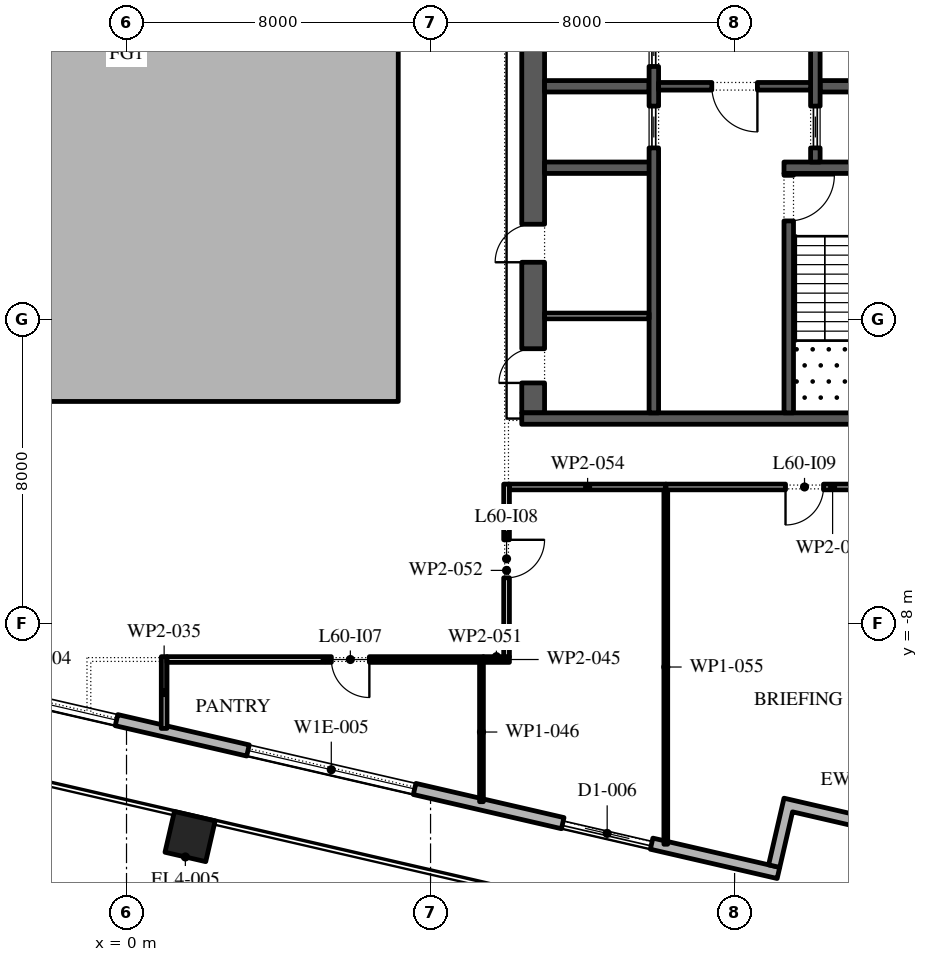
"""IFC4 building model, lengths in metres.
Left out: names, types, materials, properties, quantities, classifications, styles, units other than length and angle.
Written with IfcOpenShell. Run it as: python <this file> out.ifc"""

import sys

from ifc_helpers import new_model, si_unit, direction, frame, frame_2d, origin, origin_2d, place, context, subcontext, project, spatial, polyline, rectangle, outline, extrude, element, fill, save


model = new_model("IFC4")
c1 = context("Model", 3, precision=1e-05, world=origin(), true_north=direction((0.0, 1.0)))
c2 = subcontext(c1, "Body", "Model", "MODEL_VIEW")
j1 = project(units=[si_unit("LENGTHUNIT", "METRE"), si_unit("PLANEANGLEUNIT", "RADIAN")], contexts=[c1])
p1 = place(None, origin())
s1 = spatial("IfcSite", under=j1, at=p1, CompositionType="ELEMENT")
p2 = place(p1, origin())
s2 = spatial("IfcBuilding", under=s1, at=p2, CompositionType="ELEMENT")
p3 = place(p2, frame((0.0, 0.0, 276.6)))
s3 = spatial("IfcBuildingStorey", under=s2, at=p3, CompositionType="ELEMENT", Elevation=276.6)
p4 = place(p3, frame((1.672, -13.599, 0.0), z_axis=(0.0, 0.0, 1.0), x_axis=(0.974370064785, -0.224951054344, 0.0)))
e1 = element("IfcColumn", 1, at=p4, inside=s3, PredefinedType="COLUMN", context=c2, shape_type="SweptSolid", body=[
    extrude(rectangle(XDim=1.1, YDim=1.1, at=origin_2d()), origin(), (0.0, 0.0, 1.0), 4.2),
])
p5 = place(p3, origin())
e2 = element("IfcWall", 2, at=p5, inside=s3, PredefinedType="STANDARD", context=c2, shape_type="SweptSolid", body=[
    extrude(outline(polyline([(-7.15, -2.15), (7.15, -2.15), (7.15, 16.15), (-7.15, 16.15), (-7.15, -2.15)]), holes=[polyline([(-7.0, -2.0), (-7.0, 16.0), (7.0, 16.0), (7.0, -2.0), (-7.0, -2.0)])]), origin(), (0.0, 0.0, 1.0), 4.0),
])
p6 = place(p3, frame((-29.616, -3.758, 0.0), z_axis=(0.0, 0.0, 1.0), x_axis=(0.974370532314, -0.224949029246, 0.0)))
e3 = element("IfcWall", 3, at=p6, inside=s3, PredefinedType="STANDARD", context=c2, shape_type="SweptSolid", body=[
    extrude(rectangle(XDim=48.0, YDim=0.3, at=frame_2d((24.0, 0.0))), origin(), (0.0, 0.0, 1.0), 4.0),
])
p7 = place(p6, frame((1.625, 0.0, 0.45)))
e4 = element("IfcOpeningElement", 4, at=p7, cuts=e3, PredefinedType="OPENING", context=c2, shape_type="SweptSolid", body=[
    extrude(rectangle(XDim=4.5, YDim=3.05, at=frame_2d((2.25, 1.525))), frame((0.0, 0.16, 0.0), z_axis=(0.0, -1.0, 0.0), x_axis=(1.0, 0.0, 0.0)), (0.0, 0.0, 1.0), 0.32),
])
p8 = place(p6, frame((10.575, 0.0, 0.0)))
e5 = element("IfcOpeningElement", 5, at=p8, cuts=e3, PredefinedType="OPENING", context=c2, shape_type="SweptSolid", body=[
    extrude(rectangle(XDim=2.4, YDim=3.5, at=frame_2d((1.2, 1.75))), frame((0.0, 0.16, 0.0), z_axis=(0.0, -1.0, 0.0), x_axis=(1.0, 0.0, 0.0)), (0.0, 0.0, 1.0), 0.32),
])
p9 = place(p6, frame((17.575, 0.0, 0.45)))
e6 = element("IfcOpeningElement", 6, at=p9, cuts=e3, PredefinedType="OPENING", context=c2, shape_type="SweptSolid", body=[
    extrude(rectangle(XDim=4.5, YDim=3.0, at=frame_2d((2.25, 1.5))), frame((0.0, 0.16, 0.0), z_axis=(0.0, -1.0, 0.0), x_axis=(1.0, 0.0, 0.0)), (0.0, 0.0, 1.0), 0.32),
])
p10 = place(p6, frame((25.625, 0.0, 0.45)))
e7 = element("IfcOpeningElement", 7, at=p10, cuts=e3, PredefinedType="OPENING", context=c2, shape_type="SweptSolid", body=[
    extrude(rectangle(XDim=4.5, YDim=2.95, at=frame_2d((2.25, 1.475))), frame((0.0, 0.16, 0.0), z_axis=(0.0, -1.0, 0.0), x_axis=(1.0, 0.0, 0.0)), (0.0, 0.0, 1.0), 0.32),
])
p11 = place(p6, frame((33.675, 0.0, 0.45)))
e8 = element("IfcOpeningElement", 8, at=p11, cuts=e3, PredefinedType="OPENING", context=c2, shape_type="SweptSolid", body=[
    extrude(rectangle(XDim=4.5, YDim=2.825, at=frame_2d((2.25, 1.413))), frame((0.0, 0.16, 0.0), z_axis=(0.0, -1.0, 0.0), x_axis=(1.0, 0.0, 0.0)), (0.0, 0.0, 1.0), 0.32),
])
p12 = place(p6, frame((42.175, 0.0, 0.0)))
e9 = element("IfcOpeningElement", 9, at=p12, cuts=e3, PredefinedType="OPENING", context=c2, shape_type="SweptSolid", body=[
    extrude(rectangle(XDim=2.4, YDim=3.5, at=frame_2d((1.2, 1.75))), frame((0.0, 0.16, 0.0), z_axis=(0.0, -1.0, 0.0), x_axis=(1.0, 0.0, 0.0)), (0.0, 0.0, 1.0), 0.32),
])
p13 = place(p3, origin())
e10 = element("IfcWall", 10, at=p13, inside=s3, PredefinedType="STANDARD", context=c2, shape_type="SweptSolid", body=[
    extrude(outline(polyline([(19.054, -12.993), (19.459, -11.24), (21.505, -11.712), (21.438, -12.004), (19.684, -11.599), (19.279, -13.353), (17.525, -12.948), (17.188, -14.41), (16.895, -14.342), (17.3, -12.588), (19.054, -12.993)])), origin(), (0.0, 0.0, 1.0), 4.0),
])
p14 = place(p3, frame((10.7, -2.45, 0.0), z_axis=(0.0, 0.0, 1.0), x_axis=(0.0, 1.0, 0.0)))
e11 = element("IfcWall", 11, at=p14, inside=s3, PredefinedType="SHEAR", context=c2, shape_type="SweptSolid", body=[
    extrude(rectangle(XDim=27.9, YDim=0.6, at=frame_2d((13.95, 0.0))), origin(), (0.0, 0.0, 1.0), 4.0),
])
p15 = place(p14, frame((23.65, 0.0, 0.0)))
e12 = element("IfcOpeningElement", 12, at=p15, cuts=e11, PredefinedType="OPENING", context=c2, shape_type="SweptSolid", body=[
    extrude(rectangle(XDim=2.4, YDim=2.1, at=frame_2d((1.2, 1.05))), frame((0.0, 0.31, 0.0), z_axis=(0.0, -1.0, 0.0), x_axis=(1.0, 0.0, 0.0)), (0.0, 0.0, 1.0), 0.62),
])
p16 = place(p14, frame((0.788, 0.0, 0.0)))
e13 = element("IfcOpeningElement", 13, at=p16, cuts=e11, PredefinedType="OPENING", context=c2, shape_type="SweptSolid", body=[
    extrude(rectangle(XDim=0.9, YDim=2.1, at=frame_2d((0.45, 1.05))), frame((0.0, 0.31, 0.0), z_axis=(0.0, -1.0, 0.0), x_axis=(1.0, 0.0, 0.0)), (0.0, 0.0, 1.0), 0.62),
])
p17 = place(p14, frame((3.962, 0.0, 0.0)))
e14 = element("IfcOpeningElement", 14, at=p17, cuts=e11, PredefinedType="OPENING", context=c2, shape_type="SweptSolid", body=[
    extrude(rectangle(XDim=1.0, YDim=2.1, at=frame_2d((0.5, 1.05))), frame((0.0, 0.31, 0.0), z_axis=(0.0, -1.0, 0.0), x_axis=(1.0, 0.0, 0.0)), (0.0, 0.0, 1.0), 0.62),
])
p18 = place(p3, frame((10.4, -2.6, 0.0), z_axis=(0.0, 0.0, 1.0), x_axis=(1.0, 0.0, 0.0)))
e15 = element("IfcWall", 15, at=p18, inside=s3, PredefinedType="SHEAR", context=c2, shape_type="SweptSolid", body=[
    extrude(rectangle(XDim=11.2, YDim=0.3, at=frame_2d((5.6, 0.0))), origin(), (0.0, 0.0, 1.0), 4.0),
])
p19 = place(p3, frame((17.3, 4.0, 0.0), z_axis=(0.0, 0.0, 1.0), x_axis=(1.0, 0.0, 0.0)))
e16 = element("IfcWall", 16, at=p19, inside=s3, PredefinedType="SHEAR", context=c2, shape_type="SweptSolid", body=[
    extrude(rectangle(XDim=3.7, YDim=0.3, at=frame_2d((1.85, 0.0))), origin(), (0.0, 0.0, 1.0), 4.0),
])
p20 = place(p3, frame((17.425, -2.45, 0.0), z_axis=(0.0, 0.0, 1.0), x_axis=(0.0, 1.0, 0.0)))
e17 = element("IfcWall", 17, at=p20, inside=s3, PredefinedType="SHEAR", context=c2, shape_type="SweptSolid", body=[
    extrude(rectangle(XDim=6.3, YDim=0.25, at=frame_2d((3.15, 0.0))), origin(), (0.0, 0.0, 1.0), 4.0),
])
p21 = place(p20, frame((5.05, 0.0, 0.0)))
e18 = element("IfcOpeningElement", 18, at=p21, cuts=e17, PredefinedType="OPENING", context=c2, shape_type="SweptSolid", body=[
    extrude(rectangle(XDim=1.2, YDim=2.1, at=frame_2d((0.6, 1.05))), frame((0.0, 0.135, 0.0), z_axis=(0.0, -1.0, 0.0), x_axis=(1.0, 0.0, 0.0)), (0.0, 0.0, 1.0), 0.27),
])
p22 = place(p3, frame((18.25, 6.143, 0.0), z_axis=(0.0, 0.0, 1.0), x_axis=(1.0, 0.0, 0.0)))
e19 = element("IfcWall", 19, at=p22, inside=s3, PredefinedType="SHEAR", context=c2, shape_type="SweptSolid", body=[
    extrude(rectangle(XDim=2.75, YDim=0.3, at=frame_2d((1.375, 0.0))), origin(), (0.0, 0.0, 1.0), 4.0),
])
p23 = place(p3, frame((18.125, 4.15, 0.0), z_axis=(0.0, 0.0, 1.0), x_axis=(0.0, 1.0, 0.0)))
e20 = element("IfcWall", 20, at=p23, inside=s3, PredefinedType="SHEAR", context=c2, shape_type="SweptSolid", body=[
    extrude(rectangle(XDim=14.7, YDim=0.25, at=frame_2d((7.35, 0.0))), origin(), (0.0, 0.0, 1.0), 4.0),
])
p24 = place(p23, frame((4.296, 0.0, 0.0)))
e21 = element("IfcOpeningElement", 21, at=p24, cuts=e20, PredefinedType="OPENING", context=c2, shape_type="SweptSolid", body=[
    extrude(rectangle(XDim=0.9, YDim=2.1, at=frame_2d((0.45, 1.05))), frame((0.0, 0.135, 0.0), z_axis=(0.0, -1.0, 0.0), x_axis=(1.0, 0.0, 0.0)), (0.0, 0.0, 1.0), 0.27),
])
p25 = place(p23, frame((9.504, 0.0, 0.0)))
e22 = element("IfcOpeningElement", 22, at=p25, cuts=e20, PredefinedType="OPENING", context=c2, shape_type="SweptSolid", body=[
    extrude(rectangle(XDim=0.9, YDim=2.1, at=frame_2d((0.45, 1.05))), frame((0.0, 0.135, 0.0), z_axis=(0.0, -1.0, 0.0), x_axis=(1.0, 0.0, 0.0)), (0.0, 0.0, 1.0), 0.27),
])
p26 = place(p23, frame((0.371, 0.0, 0.0)))
e23 = element("IfcOpeningElement", 23, at=p26, cuts=e20, PredefinedType="OPENING", context=c2, shape_type="SweptSolid", body=[
    extrude(rectangle(XDim=1.1, YDim=2.1, at=frame_2d((0.55, 1.05))), frame((0.0, 0.135, 0.0), z_axis=(0.0, -1.0, 0.0), x_axis=(1.0, 0.0, 0.0)), (0.0, 0.0, 1.0), 0.27),
])
p27 = place(p23, frame((13.229, 0.0, 0.0)))
e24 = element("IfcOpeningElement", 24, at=p27, cuts=e20, PredefinedType="OPENING", context=c2, shape_type="SweptSolid", body=[
    extrude(rectangle(XDim=1.1, YDim=2.1, at=frame_2d((0.55, 1.05))), frame((0.0, 0.135, 0.0), z_axis=(0.0, -1.0, 0.0), x_axis=(1.0, 0.0, 0.0)), (0.0, 0.0, 1.0), 0.27),
])
p28 = place(p3, frame((11.0, 4.0, 0.0), z_axis=(0.0, 0.0, 1.0), x_axis=(1.0, 0.0, 0.0)))
e25 = element("IfcWall", 25, at=p28, inside=s3, PredefinedType="SHEAR", context=c2, shape_type="SweptSolid", body=[
    extrude(rectangle(XDim=3.0, YDim=0.3, at=frame_2d((1.5, 0.0))), origin(), (0.0, 0.0, 1.0), 4.0),
])
p29 = place(p3, frame((11.0, 6.143, 0.0), z_axis=(0.0, 0.0, 1.0), x_axis=(1.0, 0.0, 0.0)))
e26 = element("IfcWall", 26, at=p29, inside=s3, PredefinedType="SHEAR", context=c2, shape_type="SweptSolid", body=[
    extrude(rectangle(XDim=2.75, YDim=0.3, at=frame_2d((1.375, 0.0))), origin(), (0.0, 0.0, 1.0), 4.0),
])
p30 = place(p3, frame((13.875, -2.45, 0.0), z_axis=(0.0, 0.0, 1.0), x_axis=(0.0, 1.0, 0.0)))
e27 = element("IfcWall", 27, at=p30, inside=s3, PredefinedType="SHEAR", context=c2, shape_type="SweptSolid", body=[
    extrude(rectangle(XDim=21.3, YDim=0.25, at=frame_2d((10.65, 0.0))), origin(), (0.0, 0.0, 1.0), 4.0),
])
p31 = place(p30, frame((17.786, 0.0, 0.0)))
e28 = element("IfcOpeningElement", 28, at=p31, cuts=e27, PredefinedType="OPENING", context=c2, shape_type="SweptSolid", body=[
    extrude(rectangle(XDim=0.9, YDim=2.1, at=frame_2d((0.45, 1.05))), frame((0.0, 0.135, 0.0), z_axis=(0.0, -1.0, 0.0), x_axis=(1.0, 0.0, 0.0)), (0.0, 0.0, 1.0), 0.27),
])
p32 = place(p30, frame((6.971, 0.0, 0.0)))
e29 = element("IfcOpeningElement", 29, at=p32, cuts=e27, PredefinedType="OPENING", context=c2, shape_type="SweptSolid", body=[
    extrude(rectangle(XDim=1.1, YDim=2.1, at=frame_2d((0.55, 1.05))), frame((0.0, 0.135, 0.0), z_axis=(0.0, -1.0, 0.0), x_axis=(1.0, 0.0, 0.0)), (0.0, 0.0, 1.0), 0.27),
])
p33 = place(p30, frame((9.114, 0.0, 0.0)))
e30 = element("IfcOpeningElement", 30, at=p33, cuts=e27, PredefinedType="OPENING", context=c2, shape_type="SweptSolid", body=[
    extrude(rectangle(XDim=1.1, YDim=2.1, at=frame_2d((0.55, 1.05))), frame((0.0, 0.135, 0.0), z_axis=(0.0, -1.0, 0.0), x_axis=(1.0, 0.0, 0.0)), (0.0, 0.0, 1.0), 0.27),
])
p34 = place(p30, frame((11.257, 0.0, 0.0)))
e31 = element("IfcOpeningElement", 31, at=p34, cuts=e27, PredefinedType="OPENING", context=c2, shape_type="SweptSolid", body=[
    extrude(rectangle(XDim=1.1, YDim=2.1, at=frame_2d((0.55, 1.05))), frame((0.0, 0.135, 0.0), z_axis=(0.0, -1.0, 0.0), x_axis=(1.0, 0.0, 0.0)), (0.0, 0.0, 1.0), 0.27),
])
p35 = place(p30, frame((13.4, 0.0, 0.0)))
e32 = element("IfcOpeningElement", 32, at=p35, cuts=e27, PredefinedType="OPENING", context=c2, shape_type="SweptSolid", body=[
    extrude(rectangle(XDim=1.1, YDim=2.1, at=frame_2d((0.55, 1.05))), frame((0.0, 0.135, 0.0), z_axis=(0.0, -1.0, 0.0), x_axis=(1.0, 0.0, 0.0)), (0.0, 0.0, 1.0), 0.27),
])
p36 = place(p3, frame((14.0, 6.143, 0.0), z_axis=(0.0, 0.0, 1.0), x_axis=(1.0, 0.0, 0.0)))
e33 = element("IfcWall", 33, at=p36, inside=s3, PredefinedType="SHEAR", context=c2, shape_type="SweptSolid", body=[
    extrude(rectangle(XDim=4.0, YDim=0.2, at=frame_2d((2.0, 0.0))), origin(), (0.0, 0.0, 1.0), 4.0),
])
p37 = place(p36, frame((1.4, 0.0, 0.0)))
e34 = element("IfcOpeningElement", 34, at=p37, cuts=e33, PredefinedType="OPENING", context=c2, shape_type="SweptSolid", body=[
    extrude(rectangle(XDim=1.2, YDim=2.1, at=frame_2d((0.6, 1.05))), frame((0.0, 0.11, 0.0), z_axis=(0.0, -1.0, 0.0), x_axis=(1.0, 0.0, 0.0)), (0.0, 0.0, 1.0), 0.22),
])
p38 = place(p3, frame((11.0, 0.1, 0.0), z_axis=(0.0, 0.0, 1.0), x_axis=(1.0, 0.0, 0.0)))
e35 = element("IfcWall", 35, at=p38, inside=s3, PredefinedType="PARTITIONING", context=c2, shape_type="SweptSolid", body=[
    extrude(rectangle(XDim=2.75, YDim=0.15, at=frame_2d((1.375, 0.0))), origin(), (0.0, 0.0, 1.0), 4.0),
])
p39 = place(p3, frame((0.99, -8.865, 0.0), z_axis=(0.0, 0.0, 1.0), x_axis=(0.0, -1.0, 0.0)))
e36 = element("IfcWall", 36, at=p39, inside=s3, PredefinedType="PARTITIONING", context=c2, shape_type="SweptSolid", body=[
    extrude(rectangle(XDim=1.888, YDim=0.15, at=frame_2d((0.944, 0.0))), origin(), (0.0, 0.0, 1.0), 4.0),
])
p40 = place(p3, frame((9.39, -8.94, 0.0), z_axis=(0.0, 0.0, 1.0), x_axis=(-1.0, 0.0, 0.0)))
e37 = element("IfcWall", 37, at=p40, inside=s3, PredefinedType="PARTITIONING", context=c2, shape_type="SweptSolid", body=[
    extrude(rectangle(XDim=8.325, YDim=0.15, at=frame_2d((4.163, 0.0))), origin(), (0.0, 0.0, 1.0), 4.0),
])
p41 = place(p40, frame((3.0, 0.0, 0.0)))
e38 = element("IfcOpeningElement", 38, at=p41, cuts=e37, PredefinedType="OPENING", context=c2, shape_type="SweptSolid", body=[
    extrude(rectangle(XDim=1.0, YDim=2.1, at=frame_2d((0.5, 1.05))), frame((0.0, 0.085, 0.0), z_axis=(0.0, -1.0, 0.0), x_axis=(1.0, 0.0, 0.0)), (0.0, 0.0, 1.0), 0.17),
])
p42 = place(p3, frame((9.34, -9.015, 0.0), z_axis=(0.0, 0.0, 1.0), x_axis=(0.0, -1.0, 0.0)))
e39 = element("IfcWall", 39, at=p42, inside=s3, PredefinedType="PARTITIONING", context=c2, shape_type="SweptSolid", body=[
    extrude(rectangle(XDim=3.666, YDim=0.1, at=frame_2d((1.833, 0.0))), origin(), (0.0, 0.0, 1.0), 4.0),
])
p43 = place(p3, frame((10.075, -8.94, 0.0), z_axis=(0.0, 0.0, 1.0), x_axis=(-1.0, 0.0, 0.0)))
e40 = element("IfcWall", 40, at=p43, inside=s3, PredefinedType="PARTITIONING", context=c2, shape_type="SweptSolid", body=[
    extrude(rectangle(XDim=0.685, YDim=0.15, at=frame_2d((0.343, 0.0))), origin(), (0.0, 0.0, 1.0), 4.0),
])
p44 = place(p3, frame((10.0, -4.325, 0.0), z_axis=(0.0, 0.0, 1.0), x_axis=(0.0, -1.0, 0.0)))
e41 = element("IfcWall", 41, at=p44, inside=s3, PredefinedType="PARTITIONING", context=c2, shape_type="SweptSolid", body=[
    extrude(rectangle(XDim=4.54, YDim=0.15, at=frame_2d((2.27, 0.0))), origin(), (0.0, 0.0, 1.0), 4.0),
])
p45 = place(p44, frame((1.465, 0.0, 0.0)))
e42 = element("IfcOpeningElement", 42, at=p45, cuts=e41, PredefinedType="OPENING", context=c2, shape_type="SweptSolid", body=[
    extrude(rectangle(XDim=1.0, YDim=2.1, at=frame_2d((0.5, 1.05))), frame((0.0, 0.085, 0.0), z_axis=(0.0, -1.0, 0.0), x_axis=(1.0, 0.0, 0.0)), (0.0, 0.0, 1.0), 0.17),
])
p46 = place(p3, frame((14.19, -4.4, 0.0), z_axis=(0.0, 0.0, 1.0), x_axis=(-1.0, 0.0, 0.0)))
e43 = element("IfcWall", 43, at=p46, inside=s3, PredefinedType="PARTITIONING", context=c2, shape_type="SweptSolid", body=[
    extrude(rectangle(XDim=4.115, YDim=0.15, at=frame_2d((2.058, 0.0))), origin(), (0.0, 0.0, 1.0), 4.0),
])
p47 = place(p3, frame((14.19, -4.475, 0.0), z_axis=(0.0, 0.0, 1.0), x_axis=(0.0, -1.0, 0.0)))
e44 = element("IfcWall", 44, at=p47, inside=s3, PredefinedType="PARTITIONING", context=c2, shape_type="SweptSolid", body=[
    extrude(rectangle(XDim=9.325, YDim=0.1, at=frame_2d((4.663, 0.0))), origin(), (0.0, 0.0, 1.0), 4.0),
])
p48 = place(p3, frame((22.968, -4.4, 0.0), z_axis=(0.0, 0.0, 1.0), x_axis=(-1.0, 0.0, 0.0)))
e45 = element("IfcWall", 45, at=p48, inside=s3, PredefinedType="PARTITIONING", context=c2, shape_type="SweptSolid", body=[
    extrude(rectangle(XDim=8.778, YDim=0.15, at=frame_2d((4.389, 0.0))), origin(), (0.0, 0.0, 1.0), 4.0),
])
p49 = place(p48, frame((4.628, 0.0, 0.0)))
e46 = element("IfcOpeningElement", 46, at=p49, cuts=e45, PredefinedType="OPENING", context=c2, shape_type="SweptSolid", body=[
    extrude(rectangle(XDim=1.0, YDim=2.1, at=frame_2d((0.5, 1.05))), frame((0.0, 0.085, 0.0), z_axis=(0.0, -1.0, 0.0), x_axis=(1.0, 0.0, 0.0)), (0.0, 0.0, 1.0), 0.17),
])
p50 = place(p10, origin())
e47 = element("IfcWindow", 47, at=p50, inside=s3, PartitioningType="DOUBLE_PANEL_VERTICAL", PredefinedType="WINDOW", context=c2, shape_type="SweptSolid", body=[
    extrude(rectangle(XDim=4.5, YDim=2.95, at=frame_2d((2.25, 1.475))), frame((0.0, 0.03, 0.0), z_axis=(0.0, -1.0, 0.0), x_axis=(1.0, 0.0, 0.0)), (0.0, 0.0, 1.0), 0.06),
])
fill(e7, e47)
p51 = place(p11, origin())
e48 = element("IfcWindow", 48, at=p51, inside=s3, PartitioningType="DOUBLE_PANEL_VERTICAL", PredefinedType="WINDOW", context=c2, shape_type="SweptSolid", body=[
    extrude(rectangle(XDim=4.5, YDim=2.825, at=frame_2d((2.25, 1.413))), frame((0.0, 0.03, 0.0), z_axis=(0.0, -1.0, 0.0), x_axis=(1.0, 0.0, 0.0)), (0.0, 0.0, 1.0), 0.06),
])
fill(e8, e48)
p52 = place(p12, origin())
e49 = element("IfcDoor", 49, at=p52, inside=s3, OperationType="DOUBLE_DOOR_SLIDING", PredefinedType="DOOR", context=c2, shape_type="SweptSolid", body=[
    extrude(rectangle(XDim=2.4, YDim=3.5, at=frame_2d((1.2, 1.75))), frame((0.0, 0.025, 0.0), z_axis=(0.0, -1.0, 0.0), x_axis=(1.0, 0.0, 0.0)), (0.0, 0.0, 1.0), 0.05),
])
fill(e9, e49)
p53 = place(p26, origin())
e50 = element("IfcDoor", 50, at=p53, inside=s3, OperationType="SLIDING_TO_LEFT", PredefinedType="DOOR", context=c2, shape_type="SweptSolid", body=[
    extrude(rectangle(XDim=1.1, YDim=2.1, at=frame_2d((0.55, 1.05))), frame((0.0, 0.025, 0.0), z_axis=(0.0, -1.0, 0.0), x_axis=(1.0, 0.0, 0.0)), (0.0, 0.0, 1.0), 0.05),
])
fill(e23, e50)
p54 = place(p32, origin())
e51 = element("IfcDoor", 51, at=p54, inside=s3, OperationType="SLIDING_TO_LEFT", PredefinedType="DOOR", context=c2, shape_type="SweptSolid", body=[
    extrude(rectangle(XDim=1.1, YDim=2.1, at=frame_2d((0.55, 1.05))), frame((0.0, 0.025, 0.0), z_axis=(0.0, -1.0, 0.0), x_axis=(1.0, 0.0, 0.0)), (0.0, 0.0, 1.0), 0.05),
])
fill(e29, e51)
p55 = place(p33, origin())
e52 = element("IfcDoor", 52, at=p55, inside=s3, OperationType="SLIDING_TO_LEFT", PredefinedType="DOOR", context=c2, shape_type="SweptSolid", body=[
    extrude(rectangle(XDim=1.1, YDim=2.1, at=frame_2d((0.55, 1.05))), frame((0.0, 0.025, 0.0), z_axis=(0.0, -1.0, 0.0), x_axis=(1.0, 0.0, 0.0)), (0.0, 0.0, 1.0), 0.05),
])
fill(e30, e52)
p56 = place(p37, frame((1.2, 0.0, 0.0), z_axis=(0.0, 0.0, 1.0), x_axis=(-1.0, 0.0, 0.0)))
e53 = element("IfcDoor", 53, at=p56, inside=s3, OperationType="SINGLE_SWING_RIGHT", PredefinedType="DOOR", context=c2, shape_type="SweptSolid", body=[
    extrude(rectangle(XDim=1.2, YDim=2.1, at=frame_2d((0.6, 1.05))), frame((0.0, 0.025, 0.0), z_axis=(0.0, -1.0, 0.0), x_axis=(1.0, 0.0, 0.0)), (0.0, 0.0, 1.0), 0.05),
])
fill(e34, e53)
p57 = place(p21, frame((1.2, 0.0, 0.0), z_axis=(0.0, 0.0, 1.0), x_axis=(-1.0, 0.0, 0.0)))
e54 = element("IfcDoor", 54, at=p57, inside=s3, OperationType="SINGLE_SWING_RIGHT", PredefinedType="DOOR", context=c2, shape_type="SweptSolid", body=[
    extrude(rectangle(XDim=1.2, YDim=2.1, at=frame_2d((0.6, 1.05))), frame((0.0, 0.025, 0.0), z_axis=(0.0, -1.0, 0.0), x_axis=(1.0, 0.0, 0.0)), (0.0, 0.0, 1.0), 0.05),
])
fill(e18, e54)
p58 = place(p16, origin())
e55 = element("IfcDoor", 55, at=p58, inside=s3, OperationType="SINGLE_SWING_RIGHT", PredefinedType="DOOR", context=c2, shape_type="SweptSolid", body=[
    extrude(rectangle(XDim=0.9, YDim=2.1, at=frame_2d((0.45, 1.05))), frame((0.0, -0.25, 0.0), z_axis=(0.0, -1.0, 0.0), x_axis=(1.0, 0.0, 0.0)), (0.0, 0.0, 1.0), 0.05),
])
fill(e13, e55)
p59 = place(p17, origin())
e56 = element("IfcDoor", 56, at=p59, inside=s3, OperationType="SINGLE_SWING_RIGHT", PredefinedType="DOOR", context=c2, shape_type="SweptSolid", body=[
    extrude(rectangle(XDim=1.0, YDim=2.1, at=frame_2d((0.5, 1.05))), frame((0.0, -0.25, 0.0), z_axis=(0.0, -1.0, 0.0), x_axis=(1.0, 0.0, 0.0)), (0.0, 0.0, 1.0), 0.05),
])
fill(e14, e56)
p60 = place(p41, origin())
e57 = element("IfcDoor", 57, at=p60, inside=s3, OperationType="SINGLE_SWING_RIGHT", PredefinedType="DOOR", context=c2, shape_type="SweptSolid", body=[
    extrude(rectangle(XDim=1.0, YDim=2.1, at=frame_2d((0.5, 1.05))), frame((0.0, 0.025, 0.0), z_axis=(0.0, -1.0, 0.0), x_axis=(1.0, 0.0, 0.0)), (0.0, 0.0, 1.0), 0.05),
])
fill(e38, e57)
p61 = place(p45, origin())
e58 = element("IfcDoor", 58, at=p61, inside=s3, OperationType="SINGLE_SWING_RIGHT", PredefinedType="DOOR", context=c2, shape_type="SweptSolid", body=[
    extrude(rectangle(XDim=1.0, YDim=2.1, at=frame_2d((0.5, 1.05))), frame((0.0, 0.025, 0.0), z_axis=(0.0, -1.0, 0.0), x_axis=(1.0, 0.0, 0.0)), (0.0, 0.0, 1.0), 0.05),
])
fill(e42, e58)
p62 = place(p49, origin())
e59 = element("IfcDoor", 59, at=p62, inside=s3, OperationType="SINGLE_SWING_LEFT", PredefinedType="DOOR", context=c2, shape_type="SweptSolid", body=[
    extrude(rectangle(XDim=1.0, YDim=2.1, at=frame_2d((0.5, 1.05))), frame((0.0, 0.025, 0.0), z_axis=(0.0, -1.0, 0.0), x_axis=(1.0, 0.0, 0.0)), (0.0, 0.0, 1.0), 0.05),
])
fill(e46, e59)
save(model, sys.argv[1])
